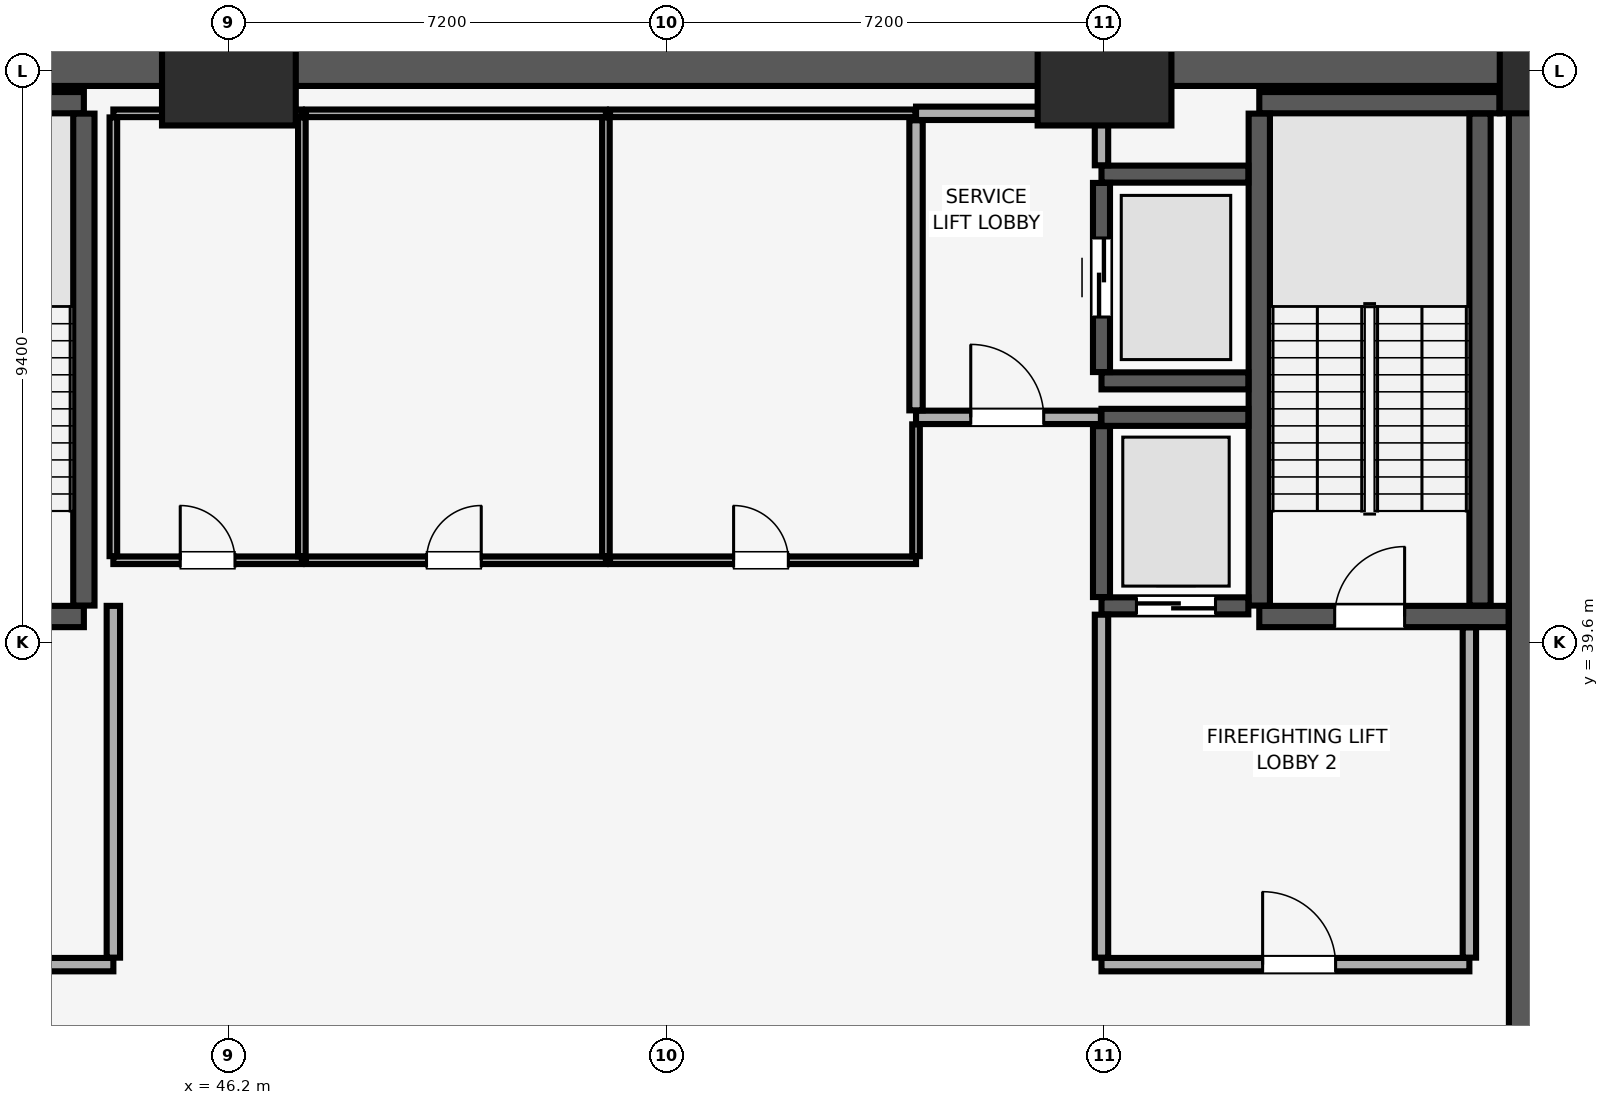
"""IFC4 building model, lengths in metres.
Left out: names, types, materials, properties, quantities, classifications, styles, units other than length and angle.
Written with IfcOpenShell. Run it as: python <this file> out.ifc"""

import sys

from ifc_helpers import new_model, si_unit, direction, frame, frame_2d, origin, origin_2d, place, context, subcontext, project, spatial, rectangle, extrude, element, fill, save


model = new_model("IFC4")
c1 = context("Model", 3, precision=1e-05, world=origin(), true_north=direction((0.0, 1.0)))
c2 = subcontext(c1, "Body", "Model", "MODEL_VIEW")
j1 = project(units=[si_unit("LENGTHUNIT", "METRE"), si_unit("PLANEANGLEUNIT", "RADIAN")], contexts=[c1])
p1 = place(None, origin())
s1 = spatial("IfcSite", under=j1, at=p1, CompositionType="ELEMENT")
p2 = place(p1, origin())
s2 = spatial("IfcBuilding", under=s1, at=p2, CompositionType="ELEMENT")
p3 = place(p2, frame((0.0, 0.0, -9.2)))
s3 = spatial("IfcBuildingStorey", under=s2, at=p3, CompositionType="ELEMENT", Elevation=-9.2)
for number, where, z_axis, x_axis in (
    (1, (46.2, 49.0, 0.0), (0.0, 0.0, 1.0), (1.0, 0.0, 0.0)),
    (2, (60.6, 49.0, 0.0), (0.0, 0.0, 1.0), (1.0, 0.0, 0.0)),
):
    element("IfcColumn", number, at=place(p3, frame(where, z_axis=z_axis, x_axis=x_axis)), inside=s3, PredefinedType="USERDEFINED", context=c2, shape_type="SweptSolid", body=[
        extrude(rectangle(XDim=2.2, YDim=1.8, at=origin_2d()), origin(), (0.0, 0.0, 1.0), 4.3),
    ])
p4 = place(p3, frame((67.8, 49.0, 0.0), z_axis=(0.0, 0.0, 1.0), x_axis=(1.0, 0.0, 0.0)))
e3 = element("IfcColumn", 3, at=p4, inside=s3, PredefinedType="COLUMN", context=c2, shape_type="SweptSolid", body=[
    extrude(rectangle(XDim=1.4, YDim=1.4, at=origin_2d()), origin(), (0.0, 0.0, 1.0), 4.3),
])
p5 = place(p3, frame((16.2, 49.3, 0.0), z_axis=(0.0, 0.0, 1.0), x_axis=(1.0, 0.0, 0.0)))
e4 = element("IfcWall", 4, at=p5, inside=s3, PredefinedType="SHEAR", context=c2, shape_type="SweptSolid", body=[
    extrude(rectangle(XDim=51.6, YDim=1.1, at=frame_2d((25.8, 0.0))), origin(), (0.0, 0.0, 1.0), 4.3),
])
p6 = place(p3, frame((67.8, 29.4, 0.0), z_axis=(0.0, 0.0, 1.0), x_axis=(0.0, 1.0, 0.0)))
e5 = element("IfcWall", 5, at=p6, inside=s3, PredefinedType="SHEAR", context=c2, shape_type="SweptSolid", body=[
    extrude(rectangle(XDim=19.2, YDim=1.1, at=frame_2d((9.6, 0.0))), origin(), (0.0, 0.0, 1.0), 4.3),
])
p7 = place(p3, frame((40.185, 40.025, 0.0), z_axis=(0.0, 0.0, 1.0), x_axis=(1.0, 0.0, 0.0)))
e6 = element("IfcWall", 6, at=p7, inside=s3, PredefinedType="SHEAR", context=c2, shape_type="SweptSolid", body=[
    extrude(rectangle(XDim=3.63, YDim=0.35, at=frame_2d((1.815, 0.0))), origin(), (0.0, 0.0, 1.0), 4.3),
])
p8 = place(p7, frame((1.24, 0.0, 0.0)))
e7 = element("IfcOpeningElement", 7, at=p8, cuts=e6, PredefinedType="OPENING", context=c2, shape_type="SweptSolid", body=[
    extrude(rectangle(XDim=1.15, YDim=2.15, at=frame_2d((0.575, 1.075))), frame((0.0, 0.185, 0.0), z_axis=(0.0, -1.0, 0.0), x_axis=(1.0, 0.0, 0.0)), (0.0, 0.0, 1.0), 0.37),
])
p9 = place(p3, frame((40.185, 48.475, 0.0), z_axis=(0.0, 0.0, 1.0), x_axis=(1.0, 0.0, 0.0)))
e8 = element("IfcWall", 8, at=p9, inside=s3, PredefinedType="SHEAR", context=c2, shape_type="SweptSolid", body=[
    extrude(rectangle(XDim=3.63, YDim=0.35, at=frame_2d((1.815, 0.0))), origin(), (0.0, 0.0, 1.0), 4.3),
])
p10 = place(p3, frame((43.815, 40.205, 0.0), z_axis=(0.0, 0.0, 1.0), x_axis=(0.0, 1.0, 0.0)))
e9 = element("IfcWall", 9, at=p10, inside=s3, PredefinedType="SHEAR", context=c2, shape_type="SweptSolid", body=[
    extrude(rectangle(XDim=8.09, YDim=0.35, at=frame_2d((4.045, 0.0))), origin(), (0.0, 0.0, 1.0), 4.3),
])
p11 = place(p3, frame((63.145, 40.025, 0.0), z_axis=(0.0, 0.0, 1.0), x_axis=(1.0, 0.0, 0.0)))
e10 = element("IfcWall", 10, at=p11, inside=s3, PredefinedType="SHEAR", context=c2, shape_type="SweptSolid", body=[
    extrude(rectangle(XDim=4.1, YDim=0.35, at=frame_2d((2.05, 0.0))), origin(), (0.0, 0.0, 1.0), 4.3),
])
p12 = place(p11, frame((1.24, 0.0, 0.0)))
e11 = element("IfcOpeningElement", 11, at=p12, cuts=e10, PredefinedType="OPENING", context=c2, shape_type="SweptSolid", body=[
    extrude(rectangle(XDim=1.15, YDim=2.15, at=frame_2d((0.575, 1.075))), frame((0.0, 0.185, 0.0), z_axis=(0.0, -1.0, 0.0), x_axis=(1.0, 0.0, 0.0)), (0.0, 0.0, 1.0), 0.37),
])
p13 = place(p3, frame((63.145, 48.475, 0.0), z_axis=(0.0, 0.0, 1.0), x_axis=(1.0, 0.0, 0.0)))
e12 = element("IfcWall", 12, at=p13, inside=s3, PredefinedType="SHEAR", context=c2, shape_type="SweptSolid", body=[
    extrude(rectangle(XDim=3.95, YDim=0.35, at=frame_2d((1.975, 0.0))), origin(), (0.0, 0.0, 1.0), 4.3),
])
for number, where, z_axis, x_axis in (
    (13, (63.145, 40.205, 0.0), (0.0, 0.0, 1.0), (0.0, 1.0, 0.0)),
    (14, (66.775, 40.205, 0.0), (0.0, 0.0, 1.0), (0.0, 1.0, 0.0)),
):
    element("IfcWall", number, at=place(p3, frame(where, z_axis=z_axis, x_axis=x_axis)), inside=s3, PredefinedType="SHEAR", context=c2, shape_type="SweptSolid", body=[
        extrude(rectangle(XDim=8.09, YDim=0.35, at=frame_2d((4.045, 0.0))), origin(), (0.0, 0.0, 1.0), 4.3),
    ])
p14 = place(p3, frame((60.55, 40.2, 0.0), z_axis=(0.0, 0.0, 1.0), x_axis=(1.0, 0.0, 0.0)))
e15 = element("IfcWall", 15, at=p14, inside=s3, PredefinedType="SHEAR", context=c2, shape_type="SweptSolid", body=[
    extrude(rectangle(XDim=2.415, YDim=0.28, at=frame_2d((1.208, 0.0))), origin(), (0.0, 0.0, 1.0), 4.3),
])
p15 = place(p14, frame((0.575, 0.0, 0.0)))
e16 = element("IfcOpeningElement", 16, at=p15, cuts=e15, PredefinedType="OPENING", context=c2, shape_type="SweptSolid", body=[
    extrude(rectangle(XDim=1.3, YDim=2.3, at=frame_2d((0.65, 1.15))), frame((0.0, 0.15, 0.0), z_axis=(0.0, -1.0, 0.0), x_axis=(1.0, 0.0, 0.0)), (0.0, 0.0, 1.0), 0.3),
])
p16 = place(p3, frame((60.55, 43.3, 0.0), z_axis=(0.0, 0.0, 1.0), x_axis=(1.0, 0.0, 0.0)))
e17 = element("IfcWall", 17, at=p16, inside=s3, PredefinedType="SHEAR", context=c2, shape_type="SweptSolid", body=[
    extrude(rectangle(XDim=2.415, YDim=0.28, at=frame_2d((1.208, 0.0))), origin(), (0.0, 0.0, 1.0), 4.3),
])
p17 = place(p3, frame((60.55, 40.345, 0.0), z_axis=(0.0, 0.0, 1.0), x_axis=(0.0, 1.0, 0.0)))
e18 = element("IfcWall", 18, at=p17, inside=s3, PredefinedType="SHEAR", context=c2, shape_type="SweptSolid", body=[
    extrude(rectangle(XDim=2.81, YDim=0.28, at=frame_2d((1.405, 0.0))), origin(), (0.0, 0.0, 1.0), 4.3),
])
for number, where, z_axis, x_axis in (
    (19, (60.55, 43.9, 0.0), (0.0, 0.0, 1.0), (1.0, 0.0, 0.0)),
    (20, (60.55, 47.3, 0.0), (0.0, 0.0, 1.0), (1.0, 0.0, 0.0)),
):
    element("IfcWall", number, at=place(p3, frame(where, z_axis=z_axis, x_axis=x_axis)), inside=s3, PredefinedType="SHEAR", context=c2, shape_type="SweptSolid", body=[
        extrude(rectangle(XDim=2.415, YDim=0.28, at=frame_2d((1.208, 0.0))), origin(), (0.0, 0.0, 1.0), 4.3),
    ])
p18 = place(p3, frame((60.55, 44.045, 0.0), z_axis=(0.0, 0.0, 1.0), x_axis=(0.0, 1.0, 0.0)))
e21 = element("IfcWall", 21, at=p18, inside=s3, PredefinedType="SHEAR", context=c2, shape_type="SweptSolid", body=[
    extrude(rectangle(XDim=3.11, YDim=0.28, at=frame_2d((1.555, 0.0))), origin(), (0.0, 0.0, 1.0), 4.3),
])
p19 = place(p18, frame((0.905, 0.0, 0.0)))
e22 = element("IfcOpeningElement", 22, at=p19, cuts=e21, PredefinedType="OPENING", context=c2, shape_type="SweptSolid", body=[
    extrude(rectangle(XDim=1.3, YDim=2.3, at=frame_2d((0.65, 1.15))), frame((0.0, 0.15, 0.0), z_axis=(0.0, -1.0, 0.0), x_axis=(1.0, 0.0, 0.0)), (0.0, 0.0, 1.0), 0.3),
])
p20 = place(p3, frame((60.55, 34.3, 0.0), z_axis=(0.0, 0.0, 1.0), x_axis=(1.0, 0.0, 0.0)))
e23 = element("IfcWall", 23, at=p20, inside=s3, PredefinedType="PARTITIONING", context=c2, shape_type="SweptSolid", body=[
    extrude(rectangle(XDim=6.05, YDim=0.22, at=frame_2d((3.025, 0.0))), origin(), (0.0, 0.0, 1.0), 4.3),
])
p21 = place(p20, frame((2.65, 0.0, 0.0)))
e24 = element("IfcOpeningElement", 24, at=p21, cuts=e23, PredefinedType="OPENING", context=c2, shape_type="SweptSolid", body=[
    extrude(rectangle(XDim=1.2, YDim=2.15, at=frame_2d((0.6, 1.075))), frame((0.0, 0.12, 0.0), z_axis=(0.0, -1.0, 0.0), x_axis=(1.0, 0.0, 0.0)), (0.0, 0.0, 1.0), 0.24),
])
p22 = place(p3, frame((60.55, 34.415, 0.0), z_axis=(0.0, 0.0, 1.0), x_axis=(0.0, 1.0, 0.0)))
e25 = element("IfcWall", 25, at=p22, inside=s3, PredefinedType="PARTITIONING", context=c2, shape_type="SweptSolid", body=[
    extrude(rectangle(XDim=5.64, YDim=0.22, at=frame_2d((2.82, 0.0))), origin(), (0.0, 0.0, 1.0), 4.3),
])
p23 = place(p3, frame((66.6, 34.415, 0.0), z_axis=(0.0, 0.0, 1.0), x_axis=(0.0, 1.0, 0.0)))
e26 = element("IfcWall", 26, at=p23, inside=s3, PredefinedType="PARTITIONING", context=c2, shape_type="SweptSolid", body=[
    extrude(rectangle(XDim=5.43, YDim=0.22, at=frame_2d((2.715, 0.0))), origin(), (0.0, 0.0, 1.0), 4.3),
])
p24 = place(p3, frame((39.7, 34.3, 0.0), z_axis=(0.0, 0.0, 1.0), x_axis=(1.0, 0.0, 0.0)))
e27 = element("IfcWall", 27, at=p24, inside=s3, PredefinedType="PARTITIONING", context=c2, shape_type="SweptSolid", body=[
    extrude(rectangle(XDim=4.6, YDim=0.22, at=frame_2d((2.3, 0.0))), origin(), (0.0, 0.0, 1.0), 4.3),
])
p25 = place(p24, frame((1.7, 0.0, 0.0)))
e28 = element("IfcOpeningElement", 28, at=p25, cuts=e27, PredefinedType="OPENING", context=c2, shape_type="SweptSolid", body=[
    extrude(rectangle(XDim=1.2, YDim=2.15, at=frame_2d((0.6, 1.075))), frame((0.0, 0.12, 0.0), z_axis=(0.0, -1.0, 0.0), x_axis=(1.0, 0.0, 0.0)), (0.0, 0.0, 1.0), 0.24),
])
p26 = place(p3, frame((44.3, 34.415, 0.0), z_axis=(0.0, 0.0, 1.0), x_axis=(0.0, 1.0, 0.0)))
e29 = element("IfcWall", 29, at=p26, inside=s3, PredefinedType="PARTITIONING", context=c2, shape_type="SweptSolid", body=[
    extrude(rectangle(XDim=5.785, YDim=0.22, at=frame_2d((2.893, 0.0))), origin(), (0.0, 0.0, 1.0), 4.3),
])
p27 = place(p3, frame((57.5, 43.3, 0.0), z_axis=(0.0, 0.0, 1.0), x_axis=(1.0, 0.0, 0.0)))
e30 = element("IfcWall", 30, at=p27, inside=s3, PredefinedType="PARTITIONING", context=c2, shape_type="SweptSolid", body=[
    extrude(rectangle(XDim=3.04, YDim=0.22, at=frame_2d((1.52, 0.0))), origin(), (0.0, 0.0, 1.0), 4.3),
])
p28 = place(p27, frame((0.9, 0.0, 0.0)))
e31 = element("IfcOpeningElement", 31, at=p28, cuts=e30, PredefinedType="OPENING", context=c2, shape_type="SweptSolid", body=[
    extrude(rectangle(XDim=1.2, YDim=2.15, at=frame_2d((0.6, 1.075))), frame((0.0, 0.12, 0.0), z_axis=(0.0, -1.0, 0.0), x_axis=(1.0, 0.0, 0.0)), (0.0, 0.0, 1.0), 0.24),
])
p29 = place(p3, frame((57.5, 48.3, 0.0), z_axis=(0.0, 0.0, 1.0), x_axis=(1.0, 0.0, 0.0)))
e32 = element("IfcWall", 32, at=p29, inside=s3, PredefinedType="PARTITIONING", context=c2, shape_type="SweptSolid", body=[
    extrude(rectangle(XDim=3.05, YDim=0.22, at=frame_2d((1.525, 0.0))), origin(), (0.0, 0.0, 1.0), 4.3),
])
p30 = place(p3, frame((57.5, 43.415, 0.0), z_axis=(0.0, 0.0, 1.0), x_axis=(0.0, 1.0, 0.0)))
e33 = element("IfcWall", 33, at=p30, inside=s3, PredefinedType="PARTITIONING", context=c2, shape_type="SweptSolid", body=[
    extrude(rectangle(XDim=4.77, YDim=0.22, at=frame_2d((2.385, 0.0))), origin(), (0.0, 0.0, 1.0), 4.3),
])
p31 = place(p3, frame((60.55, 47.445, 0.0), z_axis=(0.0, 0.0, 1.0), x_axis=(0.0, 1.0, 0.0)))
e34 = element("IfcWall", 34, at=p31, inside=s3, PredefinedType="PARTITIONING", context=c2, shape_type="SweptSolid", body=[
    extrude(rectangle(XDim=0.74, YDim=0.22, at=frame_2d((0.37, 0.0))), origin(), (0.0, 0.0, 1.0), 4.3),
])
p32 = place(p3, frame((44.3, 40.95, 0.0), z_axis=(0.0, 0.0, 1.0), x_axis=(1.0, 0.0, 0.0)))
e35 = element("IfcWall", 35, at=p32, inside=s3, PredefinedType="PARTITIONING", context=c2, shape_type="SweptSolid", body=[
    extrude(rectangle(XDim=3.1, YDim=0.125, at=frame_2d((1.55, 0.0))), origin(), (0.0, 0.0, 1.0), 4.3),
])
p33 = place(p32, frame((1.1, 0.0, 0.0)))
e36 = element("IfcOpeningElement", 36, at=p33, cuts=e35, PredefinedType="OPENING", context=c2, shape_type="SweptSolid", body=[
    extrude(rectangle(XDim=0.9, YDim=2.1, at=frame_2d((0.45, 1.05))), frame((0.0, 0.073, 0.0), z_axis=(0.0, -1.0, 0.0), x_axis=(1.0, 0.0, 0.0)), (0.0, 0.0, 1.0), 0.145),
])
p34 = place(p3, frame((44.3, 48.3, 0.0), z_axis=(0.0, 0.0, 1.0), x_axis=(1.0, 0.0, 0.0)))
e37 = element("IfcWall", 37, at=p34, inside=s3, PredefinedType="PARTITIONING", context=c2, shape_type="SweptSolid", body=[
    extrude(rectangle(XDim=3.1, YDim=0.125, at=frame_2d((1.55, 0.0))), origin(), (0.0, 0.0, 1.0), 4.3),
])
for number, where, z_axis, x_axis in (
    (38, (44.3, 41.018, 0.0), (0.0, 0.0, 1.0), (0.0, 1.0, 0.0)),
    (39, (47.4, 41.018, 0.0), (0.0, 0.0, 1.0), (0.0, 1.0, 0.0)),
):
    element("IfcWall", number, at=place(p3, frame(where, z_axis=z_axis, x_axis=x_axis)), inside=s3, PredefinedType="PARTITIONING", context=c2, shape_type="SweptSolid", body=[
        extrude(rectangle(XDim=7.215, YDim=0.125, at=frame_2d((3.607, 0.0))), origin(), (0.0, 0.0, 1.0), 4.3),
    ])
p35 = place(p3, frame((47.468, 40.95, 0.0), z_axis=(0.0, 0.0, 1.0), x_axis=(1.0, 0.0, 0.0)))
e40 = element("IfcWall", 40, at=p35, inside=s3, PredefinedType="PARTITIONING", context=c2, shape_type="SweptSolid", body=[
    extrude(rectangle(XDim=4.932, YDim=0.125, at=frame_2d((2.466, 0.0))), origin(), (0.0, 0.0, 1.0), 4.3),
])
p36 = place(p35, frame((1.982, 0.0, 0.0)))
e41 = element("IfcOpeningElement", 41, at=p36, cuts=e40, PredefinedType="OPENING", context=c2, shape_type="SweptSolid", body=[
    extrude(rectangle(XDim=0.9, YDim=2.1, at=frame_2d((0.45, 1.05))), frame((0.0, 0.073, 0.0), z_axis=(0.0, -1.0, 0.0), x_axis=(1.0, 0.0, 0.0)), (0.0, 0.0, 1.0), 0.145),
])
p37 = place(p3, frame((47.468, 48.3, 0.0), z_axis=(0.0, 0.0, 1.0), x_axis=(1.0, 0.0, 0.0)))
e42 = element("IfcWall", 42, at=p37, inside=s3, PredefinedType="PARTITIONING", context=c2, shape_type="SweptSolid", body=[
    extrude(rectangle(XDim=4.932, YDim=0.125, at=frame_2d((2.466, 0.0))), origin(), (0.0, 0.0, 1.0), 4.3),
])
p38 = place(p3, frame((52.4, 41.018, 0.0), z_axis=(0.0, 0.0, 1.0), x_axis=(0.0, 1.0, 0.0)))
e43 = element("IfcWall", 43, at=p38, inside=s3, PredefinedType="PARTITIONING", context=c2, shape_type="SweptSolid", body=[
    extrude(rectangle(XDim=7.215, YDim=0.125, at=frame_2d((3.607, 0.0))), origin(), (0.0, 0.0, 1.0), 4.3),
])
p39 = place(p3, frame((52.468, 40.95, 0.0), z_axis=(0.0, 0.0, 1.0), x_axis=(1.0, 0.0, 0.0)))
e44 = element("IfcWall", 44, at=p39, inside=s3, PredefinedType="PARTITIONING", context=c2, shape_type="SweptSolid", body=[
    extrude(rectangle(XDim=5.032, YDim=0.125, at=frame_2d((2.516, 0.0))), origin(), (0.0, 0.0, 1.0), 4.3),
])
p40 = place(p39, frame((2.032, 0.0, 0.0)))
e45 = element("IfcOpeningElement", 45, at=p40, cuts=e44, PredefinedType="OPENING", context=c2, shape_type="SweptSolid", body=[
    extrude(rectangle(XDim=0.9, YDim=2.1, at=frame_2d((0.45, 1.05))), frame((0.0, 0.073, 0.0), z_axis=(0.0, -1.0, 0.0), x_axis=(1.0, 0.0, 0.0)), (0.0, 0.0, 1.0), 0.145),
])
p41 = place(p3, frame((52.468, 48.3, 0.0), z_axis=(0.0, 0.0, 1.0), x_axis=(1.0, 0.0, 0.0)))
e46 = element("IfcWall", 46, at=p41, inside=s3, PredefinedType="PARTITIONING", context=c2, shape_type="SweptSolid", body=[
    extrude(rectangle(XDim=5.022, YDim=0.125, at=frame_2d((2.511, 0.0))), origin(), (0.0, 0.0, 1.0), 4.3),
])
p42 = place(p3, frame((57.5, 41.018, 0.0), z_axis=(0.0, 0.0, 1.0), x_axis=(0.0, 1.0, 0.0)))
e47 = element("IfcWall", 47, at=p42, inside=s3, PredefinedType="PARTITIONING", context=c2, shape_type="SweptSolid", body=[
    extrude(rectangle(XDim=2.167, YDim=0.125, at=frame_2d((1.084, 0.0))), origin(), (0.0, 0.0, 1.0), 4.3),
])
p43 = place(p12, origin())
e48 = element("IfcDoor", 48, at=p43, inside=s3, OperationType="SINGLE_SWING_RIGHT", PredefinedType="DOOR", context=c2, shape_type="SweptSolid", body=[
    extrude(rectangle(XDim=1.15, YDim=2.15, at=frame_2d((0.575, 1.075))), frame((0.0, 0.025, 0.0), z_axis=(0.0, -1.0, 0.0), x_axis=(1.0, 0.0, 0.0)), (0.0, 0.0, 1.0), 0.05),
])
fill(e11, e48)
p44 = place(p15, origin())
e49 = element("IfcDoor", 49, at=p44, inside=s3, OperationType="DOUBLE_DOOR_SLIDING", PredefinedType="DOOR", context=c2, shape_type="SweptSolid", body=[
    extrude(rectangle(XDim=1.3, YDim=2.3, at=frame_2d((0.65, 1.15))), frame((0.0, 0.025, 0.0), z_axis=(0.0, -1.0, 0.0), x_axis=(1.0, 0.0, 0.0)), (0.0, 0.0, 1.0), 0.05),
])
fill(e16, e49)
p45 = place(p19, origin())
e50 = element("IfcDoor", 50, at=p45, inside=s3, OperationType="DOUBLE_DOOR_SLIDING", PredefinedType="DOOR", context=c2, shape_type="SweptSolid", body=[
    extrude(rectangle(XDim=1.3, YDim=2.3, at=frame_2d((0.65, 1.15))), frame((0.0, 0.025, 0.0), z_axis=(0.0, -1.0, 0.0), x_axis=(1.0, 0.0, 0.0)), (0.0, 0.0, 1.0), 0.05),
])
fill(e22, e50)
p46 = place(p21, origin())
e51 = element("IfcDoor", 51, at=p46, inside=s3, OperationType="SINGLE_SWING_LEFT", PredefinedType="DOOR", context=c2, shape_type="SweptSolid", body=[
    extrude(rectangle(XDim=1.2, YDim=2.15, at=frame_2d((0.6, 1.075))), frame((0.0, 0.025, 0.0), z_axis=(0.0, -1.0, 0.0), x_axis=(1.0, 0.0, 0.0)), (0.0, 0.0, 1.0), 0.05),
])
fill(e24, e51)
p47 = place(p28, origin())
e52 = element("IfcDoor", 52, at=p47, inside=s3, OperationType="SINGLE_SWING_LEFT", PredefinedType="DOOR", context=c2, shape_type="SweptSolid", body=[
    extrude(rectangle(XDim=1.2, YDim=2.15, at=frame_2d((0.6, 1.075))), frame((0.0, 0.025, 0.0), z_axis=(0.0, -1.0, 0.0), x_axis=(1.0, 0.0, 0.0)), (0.0, 0.0, 1.0), 0.05),
])
fill(e31, e52)
p48 = place(p33, origin())
e53 = element("IfcDoor", 53, at=p48, inside=s3, OperationType="SINGLE_SWING_LEFT", PredefinedType="DOOR", context=c2, shape_type="SweptSolid", body=[
    extrude(rectangle(XDim=0.9, YDim=2.1, at=frame_2d((0.45, 1.05))), frame((0.0, 0.025, 0.0), z_axis=(0.0, -1.0, 0.0), x_axis=(1.0, 0.0, 0.0)), (0.0, 0.0, 1.0), 0.05),
])
fill(e36, e53)
p49 = place(p36, origin())
e54 = element("IfcDoor", 54, at=p49, inside=s3, OperationType="SINGLE_SWING_RIGHT", PredefinedType="DOOR", context=c2, shape_type="SweptSolid", body=[
    extrude(rectangle(XDim=0.9, YDim=2.1, at=frame_2d((0.45, 1.05))), frame((0.0, 0.025, 0.0), z_axis=(0.0, -1.0, 0.0), x_axis=(1.0, 0.0, 0.0)), (0.0, 0.0, 1.0), 0.05),
])
fill(e41, e54)
p50 = place(p40, origin())
e55 = element("IfcDoor", 55, at=p50, inside=s3, OperationType="SINGLE_SWING_LEFT", PredefinedType="DOOR", context=c2, shape_type="SweptSolid", body=[
    extrude(rectangle(XDim=0.9, YDim=2.1, at=frame_2d((0.45, 1.05))), frame((0.0, 0.025, 0.0), z_axis=(0.0, -1.0, 0.0), x_axis=(1.0, 0.0, 0.0)), (0.0, 0.0, 1.0), 0.05),
])
fill(e45, e55)
save(model, sys.argv[1])
